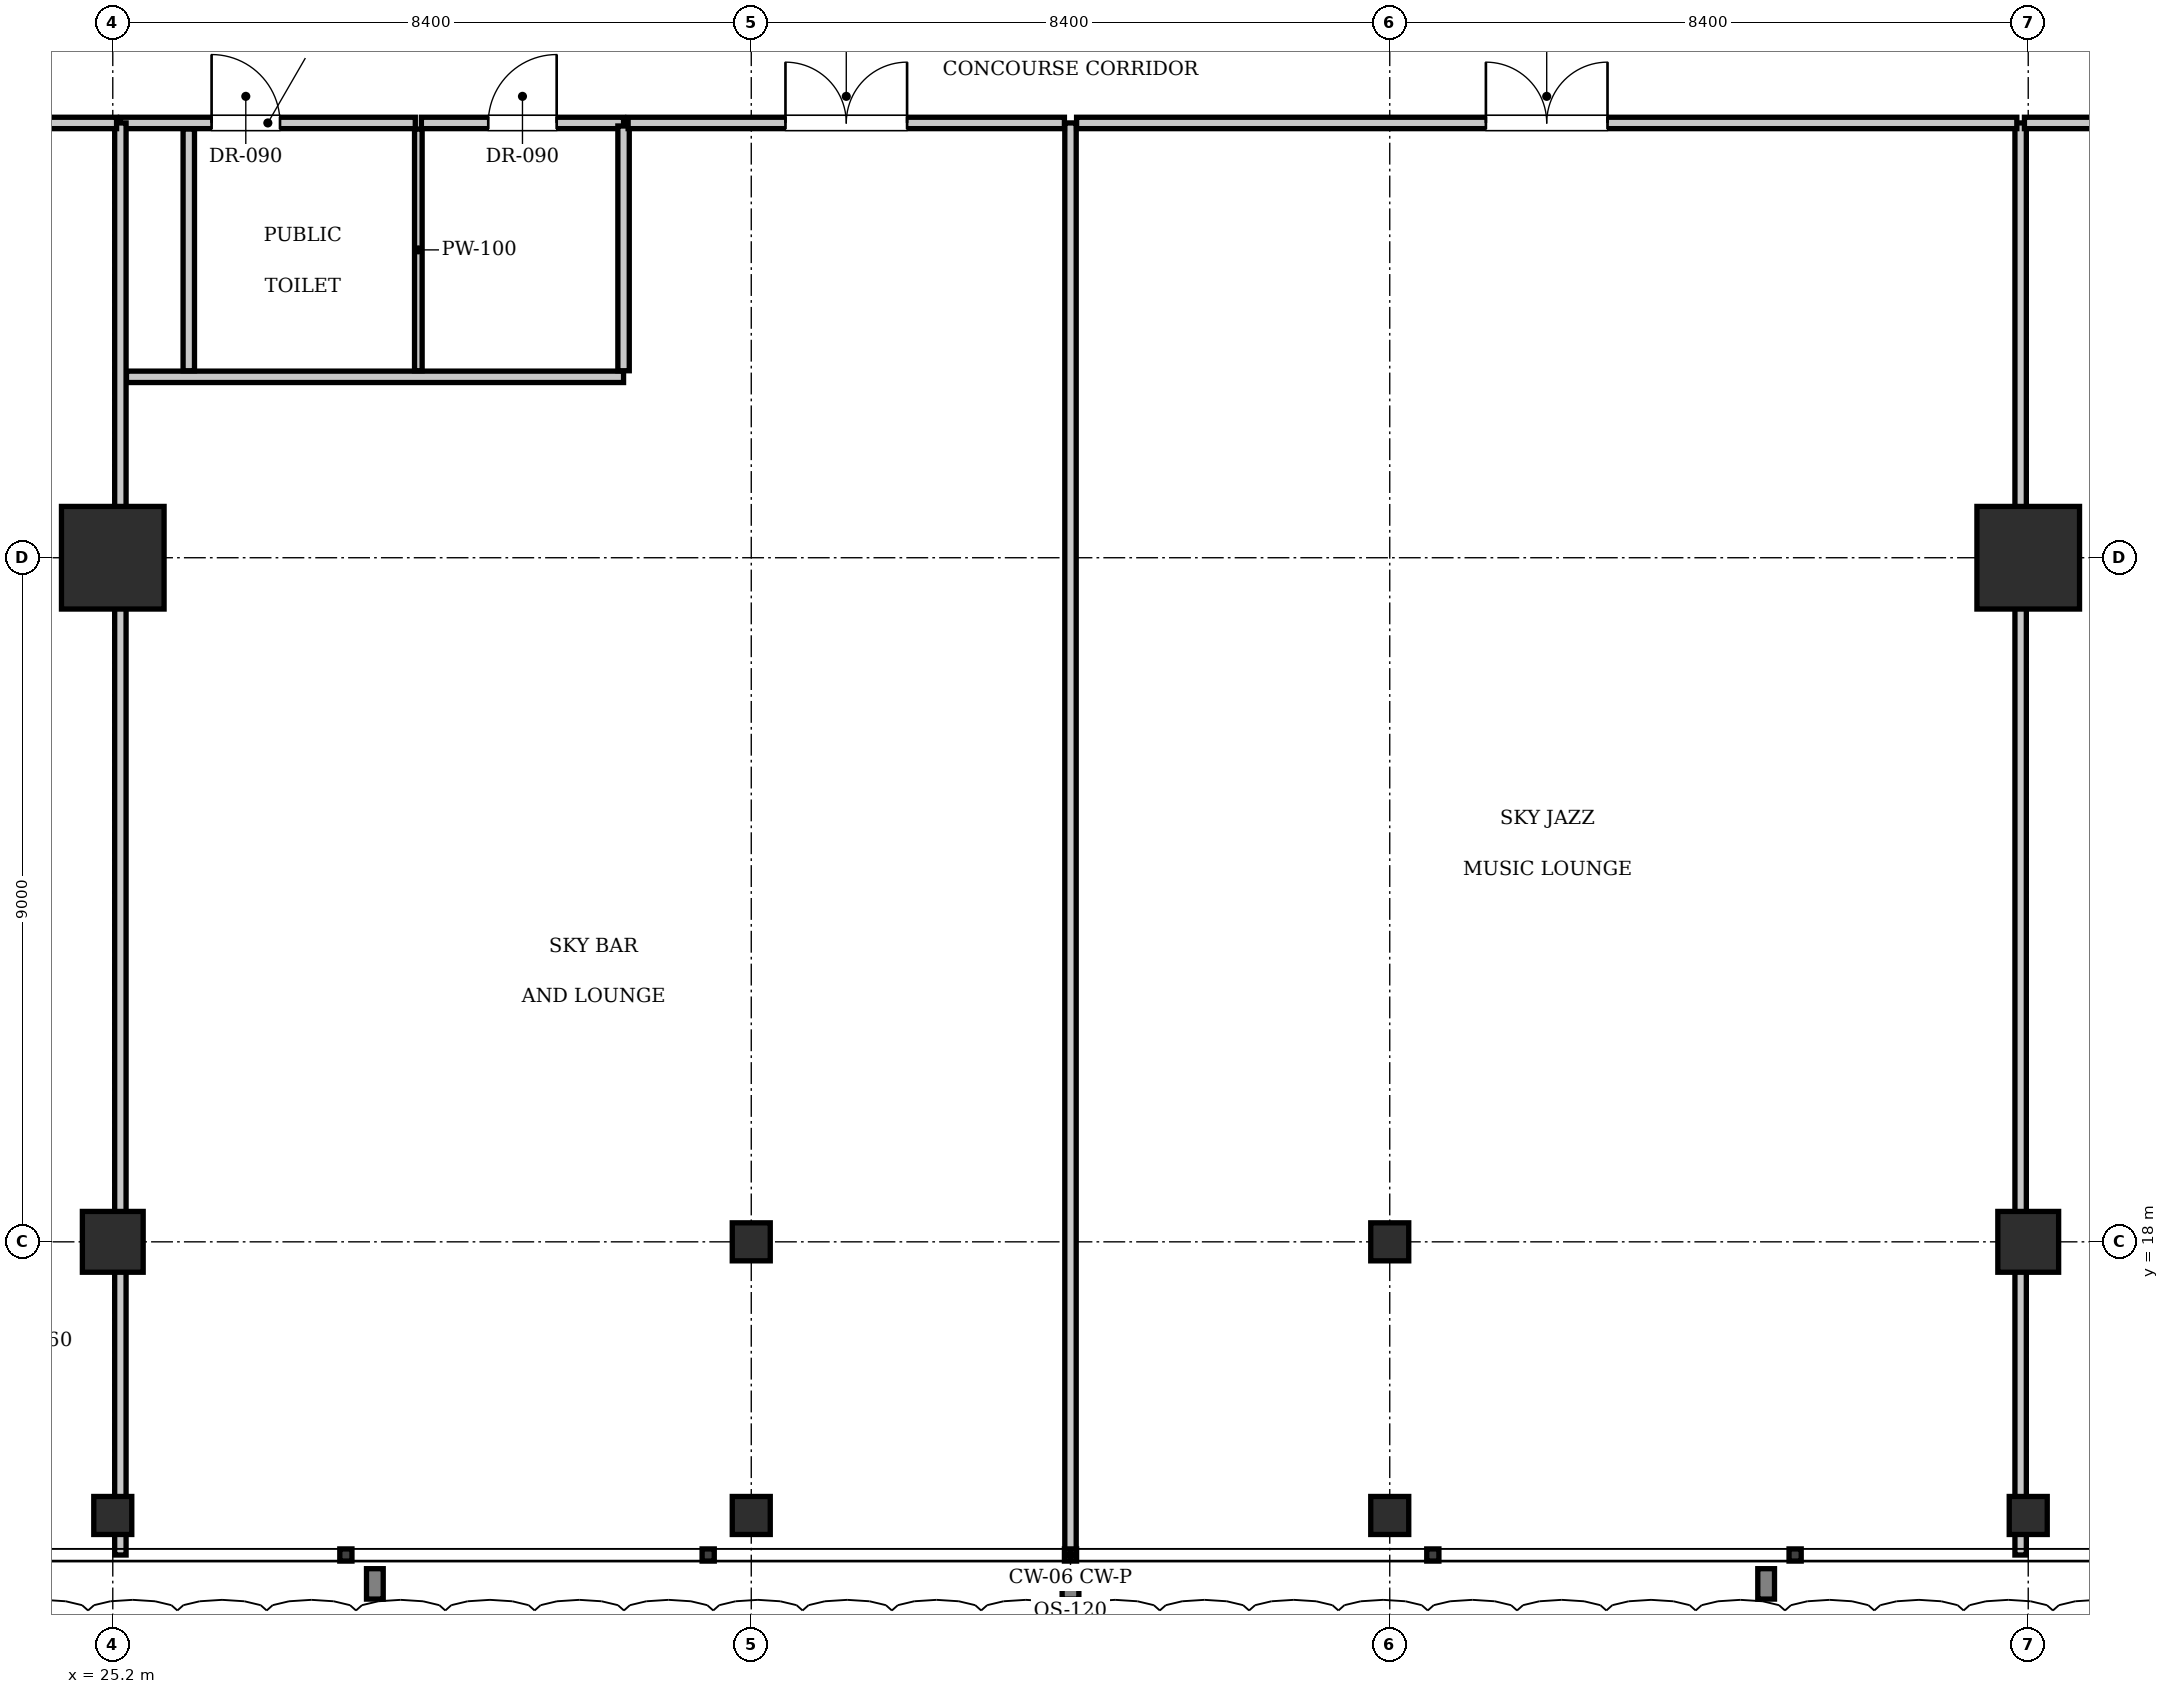
"""IFC4 building model, lengths in metres.
Left out: names, types, materials, properties, quantities, classifications, styles, units other than length and angle.
Written with IfcOpenShell. Run it as: python <this file> out.ifc"""

import sys

from ifc_helpers import new_model, si_unit, direction, frame, frame_2d, origin, origin_2d, place, context, subcontext, project, spatial, rectangle, i_section, extrude, element, fill, save


model = new_model("IFC4")
c1 = context("Model", 3, precision=1e-05, world=origin(), true_north=direction((0.0, 1.0)))
c2 = subcontext(c1, "Body", "Model", "MODEL_VIEW")
j1 = project(units=[si_unit("LENGTHUNIT", "METRE"), si_unit("PLANEANGLEUNIT", "RADIAN")], contexts=[c1])
p1 = place(None, origin())
s1 = spatial("IfcSite", under=j1, at=p1, CompositionType="ELEMENT")
p2 = place(p1, origin())
s2 = spatial("IfcBuilding", under=s1, at=p2, CompositionType="ELEMENT")
p3 = place(p2, frame((0.0, 0.0, 349.65)))
s3 = spatial("IfcBuildingStorey", under=s2, at=p3, CompositionType="ELEMENT", Elevation=349.65)
for number, where, z_axis, x_axis in (
    (1, (25.2, 27.0, 0.0), (0.0, 0.0, 1.0), (1.0, 0.0, 0.0)),
    (2, (50.4, 27.0, 0.0), (0.0, 0.0, 1.0), (1.0, 0.0, 0.0)),
):
    element("IfcColumn", number, at=place(p3, frame(where, z_axis=z_axis, x_axis=x_axis)), inside=s3, PredefinedType="COLUMN", context=c2, shape_type="SweptSolid", body=[
        extrude(rectangle(XDim=1.35, YDim=1.35, at=origin_2d()), origin(), (0.0, 0.0, 1.0), 4.55),
    ])
for number, where, z_axis, x_axis in (
    (3, (25.2, 18.0, 0.0), (0.0, 0.0, 1.0), (1.0, 0.0, 0.0)),
    (4, (50.4, 18.0, 0.0), (0.0, 0.0, 1.0), (1.0, 0.0, 0.0)),
):
    element("IfcColumn", number, at=place(p3, frame(where, z_axis=z_axis, x_axis=x_axis)), inside=s3, PredefinedType="COLUMN", context=c2, shape_type="SweptSolid", body=[
        extrude(rectangle(XDim=0.8, YDim=0.8, at=origin_2d()), origin(), (0.0, 0.0, 1.0), 4.55),
    ])
for number, where, z_axis, x_axis in (
    (5, (33.6, 18.0, 0.0), (0.0, 0.0, 1.0), (1.0, 0.0, 0.0)),
    (6, (42.0, 18.0, 0.0), (0.0, 0.0, 1.0), (1.0, 0.0, 0.0)),
    (7, (25.2, 14.4, 0.0), (0.0, 0.0, 1.0), (1.0, 0.0, 0.0)),
    (8, (33.6, 14.4, 0.0), (0.0, 0.0, 1.0), (1.0, 0.0, 0.0)),
    (9, (42.0, 14.4, 0.0), (0.0, 0.0, 1.0), (1.0, 0.0, 0.0)),
    (10, (50.4, 14.4, 0.0), (0.0, 0.0, 1.0), (1.0, 0.0, 0.0)),
):
    element("IfcColumn", number, at=place(p3, frame(where, z_axis=z_axis, x_axis=x_axis)), inside=s3, PredefinedType="COLUMN", context=c2, shape_type="SweptSolid", body=[
        extrude(i_section(OverallWidth=0.5, OverallDepth=0.5, WebThickness=0.022, FlangeThickness=0.032, at=origin_2d()), origin(), (0.0, 0.0, 1.0), 4.55),
    ])
p4 = place(p3, frame((25.3, 32.72, 0.0), z_axis=(0.0, 0.0, 1.0), x_axis=(1.0, 0.0, 0.0)))
e11 = element("IfcWall", 11, at=p4, inside=s3, PredefinedType="PARTITIONING", context=c2, shape_type="SweptSolid", body=[
    extrude(rectangle(XDim=3.88, YDim=0.15, at=frame_2d((1.94, 0.0))), origin(), (0.0, 0.0, 1.0), 4.29),
])
p5 = place(p4, frame((1.2, 0.0, 0.0)))
e12 = element("IfcOpeningElement", 12, at=p5, cuts=e11, PredefinedType="OPENING", context=c2, shape_type="SweptSolid", body=[
    extrude(rectangle(XDim=0.9, YDim=2.1, at=frame_2d((0.45, 1.05))), frame((0.0, 0.085, 0.0), z_axis=(0.0, -1.0, 0.0), x_axis=(1.0, 0.0, 0.0)), (0.0, 0.0, 1.0), 0.17),
])
p6 = place(p3, frame((29.26, 32.72, 0.0), z_axis=(0.0, 0.0, 1.0), x_axis=(1.0, 0.0, 0.0)))
e13 = element("IfcWall", 13, at=p6, inside=s3, PredefinedType="PARTITIONING", context=c2, shape_type="SweptSolid", body=[
    extrude(rectangle(XDim=2.66, YDim=0.15, at=frame_2d((1.33, 0.0))), origin(), (0.0, 0.0, 1.0), 4.29),
])
p7 = place(p6, frame((0.88, 0.0, 0.0)))
e14 = element("IfcOpeningElement", 14, at=p7, cuts=e13, PredefinedType="OPENING", context=c2, shape_type="SweptSolid", body=[
    extrude(rectangle(XDim=0.9, YDim=2.1, at=frame_2d((0.45, 1.05))), frame((0.0, 0.085, 0.0), z_axis=(0.0, -1.0, 0.0), x_axis=(1.0, 0.0, 0.0)), (0.0, 0.0, 1.0), 0.17),
])
p8 = place(p3, frame((25.38, 29.38, 0.0), z_axis=(0.0, 0.0, 1.0), x_axis=(1.0, 0.0, 0.0)))
e15 = element("IfcWall", 15, at=p8, inside=s3, PredefinedType="PARTITIONING", context=c2, shape_type="SweptSolid", body=[
    extrude(rectangle(XDim=6.54, YDim=0.15, at=frame_2d((3.27, 0.0))), origin(), (0.0, 0.0, 1.0), 4.29),
])
p9 = place(p3, frame((26.2, 29.46, 0.0), z_axis=(0.0, 0.0, 1.0), x_axis=(0.0, 1.0, 0.0)))
e16 = element("IfcWall", 16, at=p9, inside=s3, PredefinedType="PARTITIONING", context=c2, shape_type="SweptSolid", body=[
    extrude(rectangle(XDim=3.18, YDim=0.15, at=frame_2d((1.59, 0.0))), origin(), (0.0, 0.0, 1.0), 4.29),
])
p10 = place(p3, frame((29.22, 29.46, 0.0), z_axis=(0.0, 0.0, 1.0), x_axis=(0.0, 1.0, 0.0)))
e17 = element("IfcWall", 17, at=p10, inside=s3, PredefinedType="PARTITIONING", context=c2, shape_type="SweptSolid", body=[
    extrude(rectangle(XDim=3.18, YDim=0.1, at=frame_2d((1.59, 0.0))), origin(), (0.0, 0.0, 1.0), 4.29),
])
p11 = place(p3, frame((31.92, 29.46, 0.0), z_axis=(0.0, 0.0, 1.0), x_axis=(0.0, 1.0, 0.0)))
e18 = element("IfcWall", 18, at=p11, inside=s3, PredefinedType="PARTITIONING", context=c2, shape_type="SweptSolid", body=[
    extrude(rectangle(XDim=3.22, YDim=0.15, at=frame_2d((1.61, 0.0))), origin(), (0.0, 0.0, 1.0), 4.29),
])
p12 = place(p3, frame((37.8, 13.88, 0.0), z_axis=(0.0, 0.0, 1.0), x_axis=(0.0, 1.0, 0.0)))
e19 = element("IfcWall", 19, at=p12, inside=s3, PredefinedType="PARTITIONING", context=c2, shape_type="SweptSolid", body=[
    extrude(rectangle(XDim=18.84, YDim=0.15, at=frame_2d((9.42, 0.0))), origin(), (0.0, 0.0, 1.0), 4.29),
])
for number, where, z_axis, x_axis in (
    (20, (25.3, 13.88, 0.0), (0.0, 0.0, 1.0), (0.0, 1.0, 0.0)),
    (21, (50.3, 13.88, 0.0), (0.0, 0.0, 1.0), (0.0, 1.0, 0.0)),
):
    element("IfcWall", number, at=place(p3, frame(where, z_axis=z_axis, x_axis=x_axis)), inside=s3, PredefinedType="PARTITIONING", context=c2, shape_type="SweptSolid", body=[
        extrude(rectangle(XDim=18.84, YDim=0.15, at=frame_2d((9.42, 0.0))), origin(), (0.0, 0.0, 1.0), 3.821),
    ])
p13 = place(p3, frame((17.78, 32.72, 0.0), z_axis=(0.0, 0.0, 1.0), x_axis=(1.0, 0.0, 0.0)))
e22 = element("IfcWall", 22, at=p13, inside=s3, PredefinedType="PARTITIONING", context=c2, shape_type="SweptSolid", body=[
    extrude(rectangle(XDim=7.47, YDim=0.15, at=frame_2d((3.735, 0.0))), origin(), (0.0, 0.0, 1.0), 4.29),
])
p14 = place(p13, frame((3.285, 0.0, 0.0)))
e23 = element("IfcOpeningElement", 23, at=p14, cuts=e22, PredefinedType="OPENING", context=c2, shape_type="SweptSolid", body=[
    extrude(rectangle(XDim=0.9, YDim=2.1, at=frame_2d((0.45, 1.05))), frame((0.0, 0.085, 0.0), z_axis=(0.0, -1.0, 0.0), x_axis=(1.0, 0.0, 0.0)), (0.0, 0.0, 1.0), 0.17),
])
p15 = place(p3, frame((31.98, 32.72, 0.0), z_axis=(0.0, 0.0, 1.0), x_axis=(1.0, 0.0, 0.0)))
e24 = element("IfcWall", 24, at=p15, inside=s3, PredefinedType="PARTITIONING", context=c2, shape_type="SweptSolid", body=[
    extrude(rectangle(XDim=5.74, YDim=0.15, at=frame_2d((2.87, 0.0))), origin(), (0.0, 0.0, 1.0), 4.29),
])
p16 = place(p15, frame((2.07, 0.0, 0.0)))
e25 = element("IfcOpeningElement", 25, at=p16, cuts=e24, PredefinedType="OPENING", context=c2, shape_type="SweptSolid", body=[
    extrude(rectangle(XDim=1.6, YDim=2.3, at=frame_2d((0.8, 1.15))), frame((0.0, 0.085, 0.0), z_axis=(0.0, -1.0, 0.0), x_axis=(1.0, 0.0, 0.0)), (0.0, 0.0, 1.0), 0.17),
])
p17 = place(p3, frame((37.88, 32.72, 0.0), z_axis=(0.0, 0.0, 1.0), x_axis=(1.0, 0.0, 0.0)))
e26 = element("IfcWall", 26, at=p17, inside=s3, PredefinedType="PARTITIONING", context=c2, shape_type="SweptSolid", body=[
    extrude(rectangle(XDim=12.37, YDim=0.15, at=frame_2d((6.185, 0.0))), origin(), (0.0, 0.0, 1.0), 4.29),
])
p18 = place(p17, frame((5.385, 0.0, 0.0)))
e27 = element("IfcOpeningElement", 27, at=p18, cuts=e26, PredefinedType="OPENING", context=c2, shape_type="SweptSolid", body=[
    extrude(rectangle(XDim=1.6, YDim=2.3, at=frame_2d((0.8, 1.15))), frame((0.0, 0.085, 0.0), z_axis=(0.0, -1.0, 0.0), x_axis=(1.0, 0.0, 0.0)), (0.0, 0.0, 1.0), 0.17),
])
p19 = place(p3, frame((50.35, 32.72, 0.0), z_axis=(0.0, 0.0, 1.0), x_axis=(1.0, 0.0, 0.0)))
e28 = element("IfcWall", 28, at=p19, inside=s3, PredefinedType="PARTITIONING", context=c2, shape_type="SweptSolid", body=[
    extrude(rectangle(XDim=7.47, YDim=0.15, at=frame_2d((3.735, 0.0))), origin(), (0.0, 0.0, 1.0), 4.29),
])
p20 = place(p19, frame((3.285, 0.0, 0.0)))
e29 = element("IfcOpeningElement", 29, at=p20, cuts=e28, PredefinedType="OPENING", context=c2, shape_type="SweptSolid", body=[
    extrude(rectangle(XDim=0.9, YDim=2.1, at=frame_2d((0.45, 1.05))), frame((0.0, 0.085, 0.0), z_axis=(0.0, -1.0, 0.0), x_axis=(1.0, 0.0, 0.0)), (0.0, 0.0, 1.0), 0.17),
])
p21 = place(p5, origin())
e30 = element("IfcDoor", 30, at=p21, inside=s3, OperationType="SINGLE_SWING_LEFT", PredefinedType="DOOR", context=c2, shape_type="SweptSolid", body=[
    extrude(rectangle(XDim=0.9, YDim=2.1, at=frame_2d((0.45, 1.05))), frame((0.0, 0.025, 0.0), z_axis=(0.0, -1.0, 0.0), x_axis=(1.0, 0.0, 0.0)), (0.0, 0.0, 1.0), 0.05),
])
fill(e12, e30)
p22 = place(p7, origin())
e31 = element("IfcDoor", 31, at=p22, inside=s3, OperationType="SINGLE_SWING_RIGHT", PredefinedType="DOOR", context=c2, shape_type="SweptSolid", body=[
    extrude(rectangle(XDim=0.9, YDim=2.1, at=frame_2d((0.45, 1.05))), frame((0.0, 0.025, 0.0), z_axis=(0.0, -1.0, 0.0), x_axis=(1.0, 0.0, 0.0)), (0.0, 0.0, 1.0), 0.05),
])
fill(e14, e31)
p23 = place(p16, origin())
e32 = element("IfcDoor", 32, at=p23, inside=s3, OperationType="DOUBLE_DOOR_SINGLE_SWING", PredefinedType="DOOR", context=c2, shape_type="SweptSolid", body=[
    extrude(rectangle(XDim=1.6, YDim=2.3, at=frame_2d((0.8, 1.15))), frame((0.0, 0.025, 0.0), z_axis=(0.0, -1.0, 0.0), x_axis=(1.0, 0.0, 0.0)), (0.0, 0.0, 1.0), 0.05),
])
fill(e25, e32)
p24 = place(p18, origin())
e33 = element("IfcDoor", 33, at=p24, inside=s3, OperationType="DOUBLE_DOOR_SINGLE_SWING", PredefinedType="DOOR", context=c2, shape_type="SweptSolid", body=[
    extrude(rectangle(XDim=1.6, YDim=2.3, at=frame_2d((0.8, 1.15))), frame((0.0, 0.025, 0.0), z_axis=(0.0, -1.0, 0.0), x_axis=(1.0, 0.0, 0.0)), (0.0, 0.0, 1.0), 0.05),
])
fill(e27, e33)
save(model, sys.argv[1])
